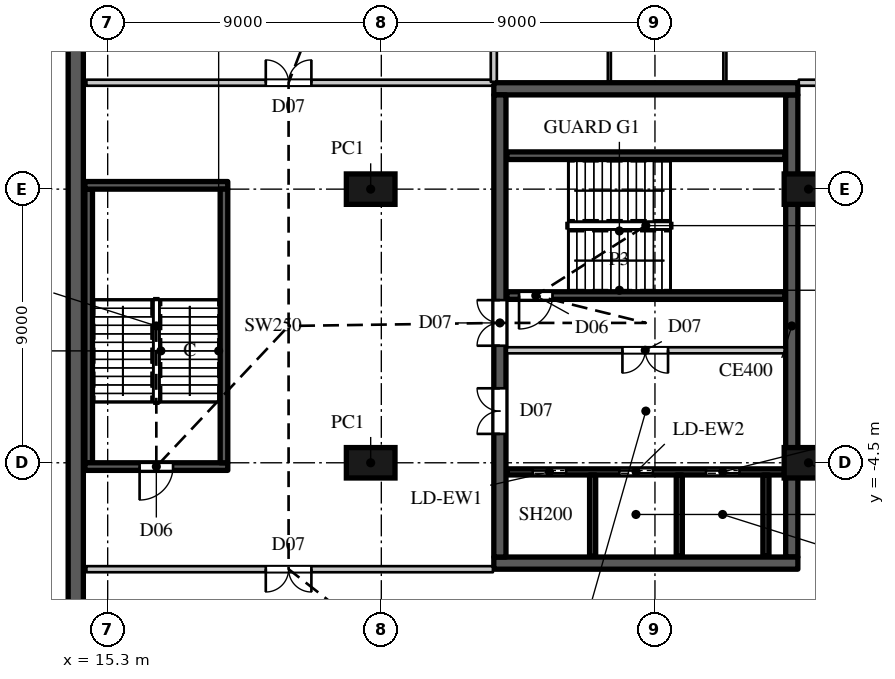
"""IFC4 building model, lengths in metres.
Left out: names, types, materials, properties, quantities, classifications, styles, units other than length and angle.
Written with IfcOpenShell. Run it as: python <this file> out.ifc"""

import sys

from ifc_helpers import new_model, si_unit, direction, frame, frame_2d, origin, origin_2d, place, context, subcontext, project, spatial, rectangle, extrude, element, fill, save


model = new_model("IFC4")
c1 = context("Model", 3, precision=1e-05, world=origin(), true_north=direction((0.0, 1.0)))
c2 = subcontext(c1, "Body", "Model", "MODEL_VIEW")
j1 = project(units=[si_unit("LENGTHUNIT", "METRE"), si_unit("PLANEANGLEUNIT", "RADIAN")], contexts=[c1])
p1 = place(None, origin())
s1 = spatial("IfcSite", under=j1, at=p1, CompositionType="ELEMENT")
p2 = place(p1, origin())
s2 = spatial("IfcBuilding", under=s1, at=p2, CompositionType="ELEMENT")
p3 = place(p2, origin())
s3 = spatial("IfcBuildingStorey", under=s2, at=p3, CompositionType="ELEMENT", Elevation=0.0)
p4 = place(p3, frame((14.25, -19.5, 0.0), z_axis=(0.0, 0.0, 1.0), x_axis=(0.0, 1.0, 0.0)))
e1 = element("IfcWall", 1, at=p4, inside=s3, PredefinedType="SOLIDWALL", context=c2, shape_type="SweptSolid", body=[
    extrude(rectangle(XDim=39.0, YDim=0.5, at=frame_2d((19.5, 0.0))), origin(), (0.0, 0.0, 1.0), 9.0),
])
for number, where, z_axis, x_axis in (
    (2, (23.95, -4.5, 0.0), (0.0, 0.0, 1.0), (0.0, 1.0, 0.0)),
    (3, (23.95, 4.5, 0.0), (0.0, 0.0, 1.0), (0.0, 1.0, 0.0)),
    (4, (38.35, -4.5, 0.0), (0.0, 0.0, 1.0), (0.0, 1.0, 0.0)),
    (5, (38.35, 4.5, 0.0), (0.0, 0.0, 1.0), (0.0, 1.0, 0.0)),
):
    element("IfcColumn", number, at=place(p3, frame(where, z_axis=z_axis, x_axis=x_axis)), inside=s3, PredefinedType="COLUMN", context=c2, shape_type="SweptSolid", body=[
        extrude(rectangle(XDim=1.0, YDim=1.6, at=origin_2d()), origin(), (0.0, 0.0, 1.0), 9.0),
    ])
for number, where, z_axis, x_axis in (
    (6, (28.0, 7.8, 0.0), (0.0, 0.0, 1.0), (1.0, 0.0, 0.0)),
    (7, (28.0, -7.8, 0.0), (0.0, 0.0, 1.0), (1.0, 0.0, 0.0)),
):
    element("IfcWall", number, at=place(p3, frame(where, z_axis=z_axis, x_axis=x_axis)), inside=s3, PredefinedType="SHEAR", context=c2, shape_type="SweptSolid", body=[
        extrude(rectangle(XDim=10.0, YDim=0.4, at=frame_2d((5.0, 0.0))), origin(), (0.0, 0.0, 1.0), 9.0),
    ])
p5 = place(p3, frame((37.8, -7.6, 0.0), z_axis=(0.0, 0.0, 1.0), x_axis=(0.0, 1.0, 0.0)))
e8 = element("IfcWall", 8, at=p5, inside=s3, PredefinedType="SHEAR", context=c2, shape_type="SweptSolid", body=[
    extrude(rectangle(XDim=15.2, YDim=0.4, at=frame_2d((7.6, 0.0))), origin(), (0.0, 0.0, 1.0), 9.0),
])
p6 = place(p3, frame((28.2, -7.6, 0.0), z_axis=(0.0, 0.0, 1.0), x_axis=(0.0, 1.0, 0.0)))
e9 = element("IfcWall", 9, at=p6, inside=s3, PredefinedType="SHEAR", context=c2, shape_type="SweptSolid", body=[
    extrude(rectangle(XDim=15.2, YDim=0.4, at=frame_2d((7.6, 0.0))), origin(), (0.0, 0.0, 1.0), 9.0),
])
p7 = place(p6, frame((4.05, 0.0, 0.0)))
e10 = element("IfcOpeningElement", 10, at=p7, cuts=e9, PredefinedType="OPENING", context=c2, shape_type="SweptSolid", body=[
    extrude(rectangle(XDim=1.5, YDim=2.4, at=frame_2d((0.75, 1.2))), frame((0.0, 0.21, 0.0), z_axis=(0.0, -1.0, 0.0), x_axis=(1.0, 0.0, 0.0)), (0.0, 0.0, 1.0), 0.42),
])
p8 = place(p6, frame((6.95, 0.0, 0.0)))
e11 = element("IfcOpeningElement", 11, at=p8, cuts=e9, PredefinedType="OPENING", context=c2, shape_type="SweptSolid", body=[
    extrude(rectangle(XDim=1.5, YDim=2.4, at=frame_2d((0.75, 1.2))), frame((0.0, 0.21, 0.0), z_axis=(0.0, -1.0, 0.0), x_axis=(1.0, 0.0, 0.0)), (0.0, 0.0, 1.0), 0.42),
])
p9 = place(p3, frame((14.6, -8.0, 0.0), z_axis=(0.0, 0.0, 1.0), x_axis=(1.0, 0.0, 0.0)))
e12 = element("IfcWall", 12, at=p9, inside=s3, PredefinedType="PARTITIONING", context=c2, shape_type="SweptSolid", body=[
    extrude(rectangle(XDim=13.37, YDim=0.2, at=frame_2d((6.685, 0.0))), origin(), (0.0, 0.0, 1.0), 8.598),
])
p10 = place(p9, frame((5.9, 0.0, 0.0)))
e13 = element("IfcOpeningElement", 13, at=p10, cuts=e12, PredefinedType="OPENING", context=c2, shape_type="SweptSolid", body=[
    extrude(rectangle(XDim=1.5, YDim=2.4, at=frame_2d((0.75, 1.2))), frame((0.0, 0.11, 0.0), z_axis=(0.0, -1.0, 0.0), x_axis=(1.0, 0.0, 0.0)), (0.0, 0.0, 1.0), 0.22),
])
p11 = place(p3, frame((14.6, 8.0, 0.0), z_axis=(0.0, 0.0, 1.0), x_axis=(1.0, 0.0, 0.0)))
e14 = element("IfcWall", 14, at=p11, inside=s3, PredefinedType="PARTITIONING", context=c2, shape_type="SweptSolid", body=[
    extrude(rectangle(XDim=13.37, YDim=0.2, at=frame_2d((6.685, 0.0))), origin(), (0.0, 0.0, 1.0), 8.598),
])
p12 = place(p11, frame((5.9, 0.0, 0.0)))
e15 = element("IfcOpeningElement", 15, at=p12, cuts=e14, PredefinedType="OPENING", context=c2, shape_type="SweptSolid", body=[
    extrude(rectangle(XDim=1.5, YDim=2.4, at=frame_2d((0.75, 1.2))), frame((0.0, 0.11, 0.0), z_axis=(0.0, -1.0, 0.0), x_axis=(1.0, 0.0, 0.0)), (0.0, 0.0, 1.0), 0.22),
])
p13 = place(p3, frame((28.0, 8.03, 0.0), z_axis=(0.0, 0.0, 1.0), x_axis=(0.0, 1.0, 0.0)))
e16 = element("IfcWall", 16, at=p13, inside=s3, PredefinedType="PARTITIONING", context=c2, shape_type="SweptSolid", body=[
    extrude(rectangle(XDim=4.87, YDim=0.2, at=frame_2d((2.435, 0.0))), origin(), (0.0, 0.0, 1.0), 8.598),
])
p14 = place(p13, frame((2.0, 0.0, 0.0)))
e17 = element("IfcOpeningElement", 17, at=p14, cuts=e16, PredefinedType="OPENING", context=c2, shape_type="SweptSolid", body=[
    extrude(rectangle(XDim=0.9, YDim=2.2, at=frame_2d((0.45, 1.1))), frame((0.0, 0.11, 0.0), z_axis=(0.0, -1.0, 0.0), x_axis=(1.0, 0.0, 0.0)), (0.0, 0.0, 1.0), 0.22),
])
p15 = place(p3, frame((28.43, -0.8, 0.0), z_axis=(0.0, 0.0, 1.0), x_axis=(1.0, 0.0, 0.0)))
e18 = element("IfcWall", 18, at=p15, inside=s3, PredefinedType="PARTITIONING", context=c2, shape_type="SweptSolid", body=[
    extrude(rectangle(XDim=9.14, YDim=0.2, at=frame_2d((4.57, 0.0))), origin(), (0.0, 0.0, 1.0), 8.598),
])
p16 = place(p15, frame((3.8, 0.0, 0.0)))
e19 = element("IfcOpeningElement", 19, at=p16, cuts=e18, PredefinedType="OPENING", context=c2, shape_type="SweptSolid", body=[
    extrude(rectangle(XDim=1.5, YDim=2.4, at=frame_2d((0.75, 1.2))), frame((0.0, 0.11, 0.0), z_axis=(0.0, -1.0, 0.0), x_axis=(1.0, 0.0, 0.0)), (0.0, 0.0, 1.0), 0.22),
])
p17 = place(p3, frame((38.03, 8.0, 0.0), z_axis=(0.0, 0.0, 1.0), x_axis=(1.0, 0.0, 0.0)))
e20 = element("IfcWall", 20, at=p17, inside=s3, PredefinedType="PARTITIONING", context=c2, shape_type="SweptSolid", body=[
    extrude(rectangle(XDim=0.595, YDim=0.2, at=frame_2d((0.297, 0.0))), origin(), (0.0, 0.0, 1.0), 8.598),
])
p18 = place(p3, frame((28.43, -4.8, 0.0), z_axis=(0.0, 0.0, 1.0), x_axis=(1.0, 0.0, 0.0)))
e21 = element("IfcWall", 21, at=p18, inside=s3, PredefinedType="SHEAR", context=c2, shape_type="SweptSolid", body=[
    extrude(rectangle(XDim=9.13, YDim=0.2, at=frame_2d((4.565, 0.0))), origin(), (0.0, 0.0, 1.0), 8.598),
])
p19 = place(p18, frame((0.85, 0.0, 0.0)))
e22 = element("IfcOpeningElement", 22, at=p19, cuts=e21, PredefinedType="OPENING", context=c2, shape_type="SweptSolid", body=[
    extrude(rectangle(XDim=1.1, YDim=2.2, at=frame_2d((0.55, 1.1))), frame((0.0, 0.11, 0.0), z_axis=(0.0, -1.0, 0.0), x_axis=(1.0, 0.0, 0.0)), (0.0, 0.0, 1.0), 0.22),
])
p20 = place(p18, frame((3.7, 0.0, 0.0)))
e23 = element("IfcOpeningElement", 23, at=p20, cuts=e21, PredefinedType="OPENING", context=c2, shape_type="SweptSolid", body=[
    extrude(rectangle(XDim=1.1, YDim=2.2, at=frame_2d((0.55, 1.1))), frame((0.0, 0.11, 0.0), z_axis=(0.0, -1.0, 0.0), x_axis=(1.0, 0.0, 0.0)), (0.0, 0.0, 1.0), 0.22),
])
p21 = place(p18, frame((6.55, 0.0, 0.0)))
e24 = element("IfcOpeningElement", 24, at=p21, cuts=e21, PredefinedType="OPENING", context=c2, shape_type="SweptSolid", body=[
    extrude(rectangle(XDim=1.1, YDim=2.2, at=frame_2d((0.55, 1.1))), frame((0.0, 0.11, 0.0), z_axis=(0.0, -1.0, 0.0), x_axis=(1.0, 0.0, 0.0)), (0.0, 0.0, 1.0), 0.22),
])
for number, where, z_axis, x_axis in (
    (25, (31.25, -7.57, 0.0), (0.0, 0.0, 1.0), (0.0, 1.0, 0.0)),
    (26, (34.1, -7.57, 0.0), (0.0, 0.0, 1.0), (0.0, 1.0, 0.0)),
):
    element("IfcWall", number, at=place(p3, frame(where, z_axis=z_axis, x_axis=x_axis)), inside=s3, PredefinedType="SHEAR", context=c2, shape_type="SweptSolid", body=[
        extrude(rectangle(XDim=2.67, YDim=0.2, at=frame_2d((1.335, 0.0))), origin(), (0.0, 0.0, 1.0), 9.0),
    ])
p22 = place(p3, frame((36.95, -7.57, 0.0), z_axis=(0.0, 0.0, 1.0), x_axis=(0.0, 1.0, 0.0)))
e27 = element("IfcWall", 27, at=p22, inside=s3, PredefinedType="SHEAR", context=c2, shape_type="SweptSolid", body=[
    extrude(rectangle(XDim=2.67, YDim=0.2, at=frame_2d((1.335, 0.0))), origin(), (0.0, 0.0, 1.0), 8.598),
])
p23 = place(p3, frame((14.675, -4.5, 0.0), z_axis=(0.0, 0.0, 1.0), x_axis=(0.0, 1.0, 0.0)))
e28 = element("IfcWall", 28, at=p23, inside=s3, PredefinedType="SHEAR", context=c2, shape_type="SweptSolid", body=[
    extrude(rectangle(XDim=9.0, YDim=0.25, at=frame_2d((4.5, 0.0))), origin(), (0.0, 0.0, 1.0), 8.6),
])
p24 = place(p3, frame((14.55, -4.625, 0.0), z_axis=(0.0, 0.0, 1.0), x_axis=(1.0, 0.0, 0.0)))
e29 = element("IfcWall", 29, at=p24, inside=s3, PredefinedType="SHEAR", context=c2, shape_type="SweptSolid", body=[
    extrude(rectangle(XDim=4.7, YDim=0.25, at=frame_2d((2.35, 0.0))), origin(), (0.0, 0.0, 1.0), 8.6),
])
p25 = place(p24, frame((1.8, 0.0, 0.0)))
e30 = element("IfcOpeningElement", 30, at=p25, cuts=e29, PredefinedType="OPENING", context=c2, shape_type="SweptSolid", body=[
    extrude(rectangle(XDim=1.1, YDim=2.2, at=frame_2d((0.55, 1.1))), frame((0.0, 0.135, 0.0), z_axis=(0.0, -1.0, 0.0), x_axis=(1.0, 0.0, 0.0)), (0.0, 0.0, 1.0), 0.27),
])
p26 = place(p3, frame((14.55, 4.625, 0.0), z_axis=(0.0, 0.0, 1.0), x_axis=(1.0, 0.0, 0.0)))
e31 = element("IfcWall", 31, at=p26, inside=s3, PredefinedType="SHEAR", context=c2, shape_type="SweptSolid", body=[
    extrude(rectangle(XDim=4.7, YDim=0.25, at=frame_2d((2.35, 0.0))), origin(), (0.0, 0.0, 1.0), 8.6),
])
p27 = place(p3, frame((19.125, -4.5, 0.0), z_axis=(0.0, 0.0, 1.0), x_axis=(0.0, 1.0, 0.0)))
e32 = element("IfcWall", 32, at=p27, inside=s3, PredefinedType="SHEAR", context=c2, shape_type="SweptSolid", body=[
    extrude(rectangle(XDim=9.0, YDim=0.25, at=frame_2d((4.5, 0.0))), origin(), (0.0, 0.0, 1.0), 8.6),
])
p28 = place(p3, frame((28.43, 1.0, 0.0), z_axis=(0.0, 0.0, 1.0), x_axis=(1.0, 0.0, 0.0)))
e33 = element("IfcWall", 33, at=p28, inside=s3, PredefinedType="SHEAR", context=c2, shape_type="SweptSolid", body=[
    extrude(rectangle(XDim=9.14, YDim=0.25, at=frame_2d((4.57, 0.0))), origin(), (0.0, 0.0, 1.0), 8.598),
])
p29 = place(p28, frame((0.4, 0.0, 0.0)))
e34 = element("IfcOpeningElement", 34, at=p29, cuts=e33, PredefinedType="OPENING", context=c2, shape_type="SweptSolid", body=[
    extrude(rectangle(XDim=1.1, YDim=2.2, at=frame_2d((0.55, 1.1))), frame((0.0, 0.135, 0.0), z_axis=(0.0, -1.0, 0.0), x_axis=(1.0, 0.0, 0.0)), (0.0, 0.0, 1.0), 0.27),
])
p30 = place(p3, frame((28.43, 5.6, 0.0), z_axis=(0.0, 0.0, 1.0), x_axis=(1.0, 0.0, 0.0)))
e35 = element("IfcWall", 35, at=p30, inside=s3, PredefinedType="SHEAR", context=c2, shape_type="SweptSolid", body=[
    extrude(rectangle(XDim=9.14, YDim=0.25, at=frame_2d((4.57, 0.0))), origin(), (0.0, 0.0, 1.0), 8.598),
])
for number, where, z_axis, x_axis in (
    (36, (31.8, 8.03, 0.0), (0.0, 0.0, 1.0), (0.0, 1.0, 0.0)),
    (37, (35.6, 8.03, 0.0), (0.0, 0.0, 1.0), (0.0, 1.0, 0.0)),
):
    element("IfcWall", number, at=place(p3, frame(where, z_axis=z_axis, x_axis=x_axis)), inside=s3, PredefinedType="PARTITIONING", context=c2, shape_type="SweptSolid", body=[
        extrude(rectangle(XDim=4.87, YDim=0.1, at=frame_2d((2.435, 0.0))), origin(), (0.0, 0.0, 1.0), 8.598),
    ])
p31 = place(p29, origin())
e38 = element("IfcDoor", 38, at=p31, inside=s3, OperationType="SINGLE_SWING_RIGHT", PredefinedType="DOOR", context=c2, shape_type="SweptSolid", body=[
    extrude(rectangle(XDim=1.1, YDim=2.2, at=frame_2d((0.55, 1.1))), frame((0.0, 0.025, 0.0), z_axis=(0.0, -1.0, 0.0), x_axis=(1.0, 0.0, 0.0)), (0.0, 0.0, 1.0), 0.05),
])
fill(e34, e38)
p32 = place(p16, origin())
e39 = element("IfcDoor", 39, at=p32, inside=s3, OperationType="DOUBLE_DOOR_SINGLE_SWING", PredefinedType="DOOR", context=c2, shape_type="SweptSolid", body=[
    extrude(rectangle(XDim=1.5, YDim=2.4, at=frame_2d((0.75, 1.2))), frame((0.0, 0.025, 0.0), z_axis=(0.0, -1.0, 0.0), x_axis=(1.0, 0.0, 0.0)), (0.0, 0.0, 1.0), 0.05),
])
fill(e19, e39)
p33 = place(p19, origin())
e40 = element("IfcDoor", 40, at=p33, inside=s3, OperationType="DOUBLE_DOOR_SLIDING", PredefinedType="DOOR", context=c2, shape_type="SweptSolid", body=[
    extrude(rectangle(XDim=1.1, YDim=2.2, at=frame_2d((0.55, 1.1))), frame((0.0, 0.025, 0.0), z_axis=(0.0, -1.0, 0.0), x_axis=(1.0, 0.0, 0.0)), (0.0, 0.0, 1.0), 0.05),
])
fill(e22, e40)
p34 = place(p20, origin())
e41 = element("IfcDoor", 41, at=p34, inside=s3, OperationType="DOUBLE_DOOR_SLIDING", PredefinedType="DOOR", context=c2, shape_type="SweptSolid", body=[
    extrude(rectangle(XDim=1.1, YDim=2.2, at=frame_2d((0.55, 1.1))), frame((0.0, 0.025, 0.0), z_axis=(0.0, -1.0, 0.0), x_axis=(1.0, 0.0, 0.0)), (0.0, 0.0, 1.0), 0.05),
])
fill(e23, e41)
p35 = place(p21, origin())
e42 = element("IfcDoor", 42, at=p35, inside=s3, OperationType="DOUBLE_DOOR_SLIDING", PredefinedType="DOOR", context=c2, shape_type="SweptSolid", body=[
    extrude(rectangle(XDim=1.1, YDim=2.2, at=frame_2d((0.55, 1.1))), frame((0.0, 0.025, 0.0), z_axis=(0.0, -1.0, 0.0), x_axis=(1.0, 0.0, 0.0)), (0.0, 0.0, 1.0), 0.05),
])
fill(e24, e42)
p36 = place(p10, origin())
e43 = element("IfcDoor", 43, at=p36, inside=s3, OperationType="DOUBLE_DOOR_SINGLE_SWING", PredefinedType="DOOR", context=c2, shape_type="SweptSolid", body=[
    extrude(rectangle(XDim=1.5, YDim=2.4, at=frame_2d((0.75, 1.2))), frame((0.0, 0.025, 0.0), z_axis=(0.0, -1.0, 0.0), x_axis=(1.0, 0.0, 0.0)), (0.0, 0.0, 1.0), 0.05),
])
fill(e13, e43)
p37 = place(p12, origin())
e44 = element("IfcDoor", 44, at=p37, inside=s3, OperationType="DOUBLE_DOOR_SINGLE_SWING", PredefinedType="DOOR", context=c2, shape_type="SweptSolid", body=[
    extrude(rectangle(XDim=1.5, YDim=2.4, at=frame_2d((0.75, 1.2))), frame((0.0, 0.025, 0.0), z_axis=(0.0, -1.0, 0.0), x_axis=(1.0, 0.0, 0.0)), (0.0, 0.0, 1.0), 0.05),
])
fill(e15, e44)
p38 = place(p7, origin())
e45 = element("IfcDoor", 45, at=p38, inside=s3, OperationType="DOUBLE_DOOR_SINGLE_SWING", PredefinedType="DOOR", context=c2, shape_type="SweptSolid", body=[
    extrude(rectangle(XDim=1.5, YDim=2.4, at=frame_2d((0.75, 1.2))), frame((0.0, 0.025, 0.0), z_axis=(0.0, -1.0, 0.0), x_axis=(1.0, 0.0, 0.0)), (0.0, 0.0, 1.0), 0.05),
])
fill(e10, e45)
p39 = place(p8, origin())
e46 = element("IfcDoor", 46, at=p39, inside=s3, OperationType="DOUBLE_DOOR_SINGLE_SWING", PredefinedType="DOOR", context=c2, shape_type="SweptSolid", body=[
    extrude(rectangle(XDim=1.5, YDim=2.4, at=frame_2d((0.75, 1.2))), frame((0.0, 0.025, 0.0), z_axis=(0.0, -1.0, 0.0), x_axis=(1.0, 0.0, 0.0)), (0.0, 0.0, 1.0), 0.05),
])
fill(e11, e46)
p40 = place(p25, origin())
e47 = element("IfcDoor", 47, at=p40, inside=s3, OperationType="SINGLE_SWING_RIGHT", PredefinedType="DOOR", context=c2, shape_type="SweptSolid", body=[
    extrude(rectangle(XDim=1.1, YDim=2.2, at=frame_2d((0.55, 1.1))), frame((0.0, 0.025, 0.0), z_axis=(0.0, -1.0, 0.0), x_axis=(1.0, 0.0, 0.0)), (0.0, 0.0, 1.0), 0.05),
])
fill(e30, e47)
save(model, sys.argv[1])
